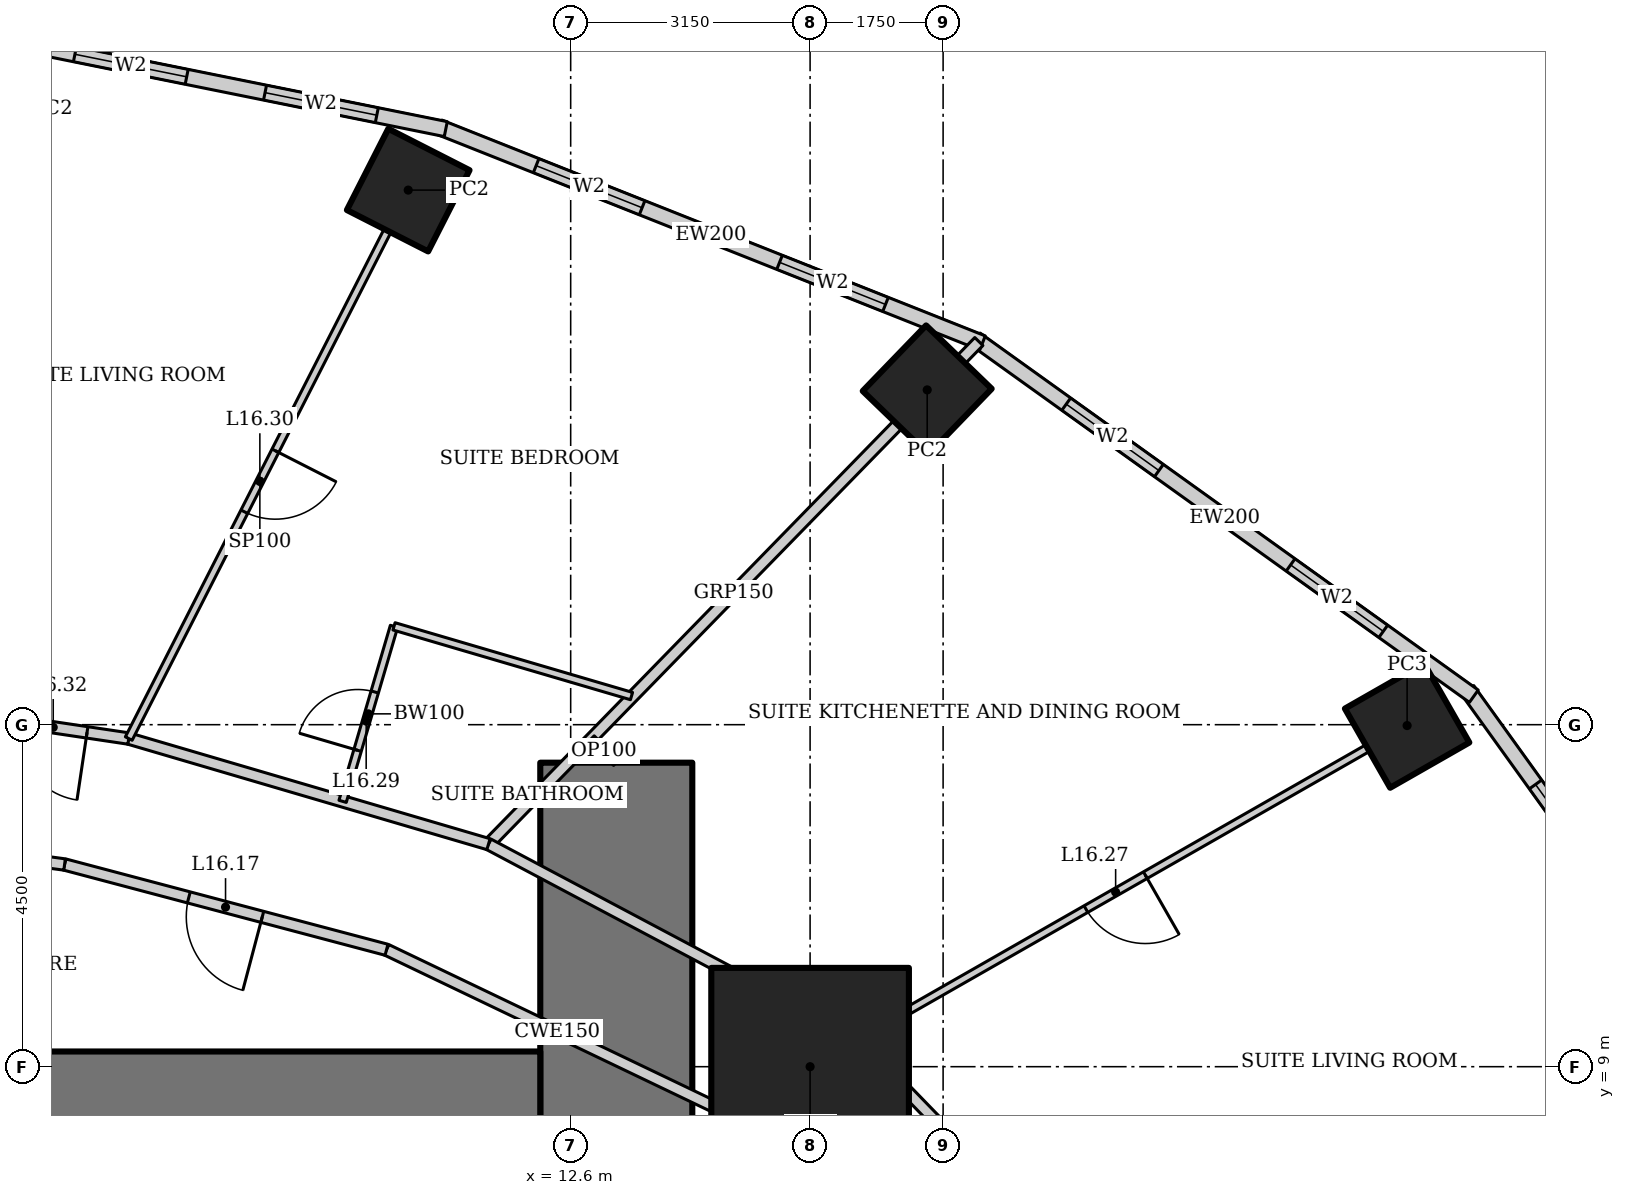
"""IFC4 building model, lengths in metres.
Left out: names, types, materials, properties, quantities, classifications, styles, units other than length and angle.
Written with IfcOpenShell. Run it as: python <this file> out.ifc"""

import sys

from ifc_helpers import new_model, si_unit, direction, frame, frame_2d, origin, origin_2d, place, context, subcontext, project, spatial, rectangle, hollow_rectangle, extrude, element, fill, save


model = new_model("IFC4")
c1 = context("Model", 3, precision=1e-05, world=origin(), true_north=direction((0.0, 1.0)))
c2 = subcontext(c1, "Body", "Model", "MODEL_VIEW")
j1 = project(units=[si_unit("LENGTHUNIT", "METRE"), si_unit("PLANEANGLEUNIT", "RADIAN")], contexts=[c1])
p1 = place(None, origin())
s1 = spatial("IfcSite", under=j1, at=p1, CompositionType="ELEMENT")
p2 = place(p1, origin())
s2 = spatial("IfcBuilding", under=s1, at=p2, CompositionType="ELEMENT")
p3 = place(p2, frame((0.0, 0.0, 73.0)))
s3 = spatial("IfcBuildingStorey", under=s2, at=p3, CompositionType="ELEMENT", Elevation=73.0)
p4 = place(p3, frame((15.75, 9.0, 0.0), z_axis=(0.0, 0.0, 1.0), x_axis=(1.0, 0.0, 0.0)))
e1 = element("IfcColumn", 1, at=p4, inside=s3, PredefinedType="COLUMN", context=c2, shape_type="SweptSolid", body=[
    extrude(hollow_rectangle(XDim=2.6, YDim=2.6, WallThickness=0.13, at=origin_2d()), origin(), (0.0, 0.0, 1.0), 3.6),
])
p5 = place(p3, frame((23.605, 13.489, 0.0), z_axis=(0.0, 0.0, 1.0), x_axis=(0.86824298017, 0.496139221777, 0.0)))
e2 = element("IfcColumn", 2, at=p5, inside=s3, PredefinedType="COLUMN", context=c2, shape_type="SweptSolid", body=[
    extrude(hollow_rectangle(XDim=1.2, YDim=1.2, WallThickness=0.12, at=origin_2d()), origin(), (0.0, 0.0, 1.0), 3.6),
])
for number, where, z_axis, x_axis in (
    (3, (17.291, 17.905, 0.0), (0.0, 0.0, 1.0), (0.695, 0.719, 0.0)),
    (4, (10.463, 20.534, 0.0), (0.0, 0.0, 1.0), (0.454, 0.891, 0.0)),
):
    element("IfcColumn", number, at=place(p3, frame(where, z_axis=z_axis, x_axis=x_axis)), inside=s3, PredefinedType="COLUMN", context=c2, shape_type="SweptSolid", body=[
        extrude(hollow_rectangle(XDim=1.2, YDim=1.2, WallThickness=0.1, at=origin_2d()), origin(), (0.0, 0.0, 1.0), 3.6),
    ])
p6 = place(p3, frame((13.2, -13.0, 0.0), z_axis=(0.0, 0.0, 1.0), x_axis=(0.0, 1.0, 0.0)))
e5 = element("IfcWall", 5, at=p6, inside=s3, PredefinedType="SHEAR", context=c2, shape_type="SweptSolid", body=[
    extrude(rectangle(XDim=26.0, YDim=2.0, at=frame_2d((13.0, 0.0))), origin(), (0.0, 0.0, 1.0), 3.6),
])
p7 = place(p6, frame((12.1, 0.0, 0.0)))
e6 = element("IfcOpeningElement", 6, at=p7, cuts=e5, PredefinedType="OPENING", context=c2, shape_type="SweptSolid", body=[
    extrude(rectangle(XDim=1.8, YDim=2.1, at=frame_2d((0.9, 1.05))), frame((0.0, 1.01, 0.0), z_axis=(0.0, -1.0, 0.0), x_axis=(1.0, 0.0, 0.0)), (0.0, 0.0, 1.0), 2.02),
])
p8 = place(p3, frame((12.2, 8.0, 0.0), z_axis=(0.0, 0.0, 1.0), x_axis=(-1.0, 0.0, 0.0)))
e7 = element("IfcWall", 7, at=p8, inside=s3, PredefinedType="SHEAR", context=c2, shape_type="SweptSolid", body=[
    extrude(rectangle(XDim=24.4, YDim=2.4, at=frame_2d((12.2, 0.0))), origin(), (0.0, 0.0, 1.0), 3.6),
])
p9 = place(p3, frame((29.26, 7.2, 0.0), z_axis=(0.0, 0.0, 1.0), x_axis=(-0.583937613703, 0.811798536155, 0.0)))
e8 = element("IfcWall", 8, at=p9, inside=s3, PredefinedType="SOLIDWALL", context=c2, shape_type="SweptSolid", body=[
    extrude(rectangle(XDim=8.323, YDim=0.2, at=frame_2d((4.162, 0.0))), origin(), (0.0, 0.0, 1.0), 3.45),
])
p10 = place(p9, frame((1.531, 0.0, 0.5)))
e9 = element("IfcOpeningElement", 9, at=p10, cuts=e8, PredefinedType="OPENING", context=c2, shape_type="SweptSolid", body=[
    extrude(rectangle(XDim=1.5, YDim=2.2, at=frame_2d((0.75, 1.1))), frame((0.0, 0.11, 0.0), z_axis=(0.0, -1.0, 0.0), x_axis=(1.0, 0.0, 0.0)), (0.0, 0.0, 1.0), 0.22),
])
p11 = place(p9, frame((5.292, 0.0, 0.5)))
e10 = element("IfcOpeningElement", 10, at=p11, cuts=e8, PredefinedType="OPENING", context=c2, shape_type="SweptSolid", body=[
    extrude(rectangle(XDim=1.5, YDim=2.2, at=frame_2d((0.75, 1.1))), frame((0.0, 0.11, 0.0), z_axis=(0.0, -1.0, 0.0), x_axis=(1.0, 0.0, 0.0)), (0.0, 0.0, 1.0), 0.22),
])
p12 = place(p3, frame((24.482, 13.875, 0.0), z_axis=(0.0, 0.0, 1.0), x_axis=(-0.812791321576, 0.582554948112, 0.0)))
e11 = element("IfcWall", 11, at=p12, inside=s3, PredefinedType="SOLIDWALL", context=c2, shape_type="SweptSolid", body=[
    extrude(rectangle(XDim=8.063, YDim=0.2, at=frame_2d((4.032, 0.0))), origin(), (0.0, 0.0, 1.0), 3.45),
])
p13 = place(p12, frame((1.466, 0.0, 0.5)))
e12 = element("IfcOpeningElement", 12, at=p13, cuts=e11, PredefinedType="OPENING", context=c2, shape_type="SweptSolid", body=[
    extrude(rectangle(XDim=1.5, YDim=2.2, at=frame_2d((0.75, 1.1))), frame((0.0, 0.11, 0.0), z_axis=(0.0, -1.0, 0.0), x_axis=(1.0, 0.0, 0.0)), (0.0, 0.0, 1.0), 0.22),
])
p14 = place(p12, frame((5.097, 0.0, 0.5)))
e13 = element("IfcOpeningElement", 13, at=p14, cuts=e11, PredefinedType="OPENING", context=c2, shape_type="SweptSolid", body=[
    extrude(rectangle(XDim=1.5, YDim=2.2, at=frame_2d((0.75, 1.1))), frame((0.0, 0.11, 0.0), z_axis=(0.0, -1.0, 0.0), x_axis=(1.0, 0.0, 0.0)), (0.0, 0.0, 1.0), 0.22),
])
p15 = place(p3, frame((18.018, 18.523, 0.0), z_axis=(0.0, 0.0, 1.0), x_axis=(-0.929358351251, 0.369178892895, 0.0)))
e14 = element("IfcWall", 14, at=p15, inside=s3, PredefinedType="SOLIDWALL", context=c2, shape_type="SweptSolid", body=[
    extrude(rectangle(XDim=7.692, YDim=0.2, at=frame_2d((3.846, 0.0))), origin(), (0.0, 0.0, 1.0), 3.45),
])
p16 = place(p15, frame((1.373, 0.0, 0.5)))
e15 = element("IfcOpeningElement", 15, at=p16, cuts=e14, PredefinedType="OPENING", context=c2, shape_type="SweptSolid", body=[
    extrude(rectangle(XDim=1.5, YDim=2.2, at=frame_2d((0.75, 1.1))), frame((0.0, 0.11, 0.0), z_axis=(0.0, -1.0, 0.0), x_axis=(1.0, 0.0, 0.0)), (0.0, 0.0, 1.0), 0.22),
])
p17 = place(p15, frame((4.819, 0.0, 0.5)))
e16 = element("IfcOpeningElement", 16, at=p17, cuts=e14, PredefinedType="OPENING", context=c2, shape_type="SweptSolid", body=[
    extrude(rectangle(XDim=1.5, YDim=2.2, at=frame_2d((0.75, 1.1))), frame((0.0, 0.11, 0.0), z_axis=(0.0, -1.0, 0.0), x_axis=(1.0, 0.0, 0.0)), (0.0, 0.0, 1.0), 0.22),
])
p18 = place(p3, frame((10.957, 21.337, 0.0), z_axis=(0.0, 0.0, 1.0), x_axis=(-0.980251657452, 0.197754110105, 0.0)))
e17 = element("IfcWall", 17, at=p18, inside=s3, PredefinedType="SOLIDWALL", context=c2, shape_type="SweptSolid", body=[
    extrude(rectangle(XDim=5.904, YDim=0.2, at=frame_2d((2.952, 0.0))), origin(), (0.0, 0.0, 1.0), 3.45),
])
p19 = place(p18, frame((0.926, 0.0, 0.5)))
e18 = element("IfcOpeningElement", 18, at=p19, cuts=e17, PredefinedType="OPENING", context=c2, shape_type="SweptSolid", body=[
    extrude(rectangle(XDim=1.5, YDim=2.2, at=frame_2d((0.75, 1.1))), frame((0.0, 0.11, 0.0), z_axis=(0.0, -1.0, 0.0), x_axis=(1.0, 0.0, 0.0)), (0.0, 0.0, 1.0), 0.22),
])
p20 = place(p18, frame((3.478, 0.0, 0.5)))
e19 = element("IfcOpeningElement", 19, at=p20, cuts=e17, PredefinedType="OPENING", context=c2, shape_type="SweptSolid", body=[
    extrude(rectangle(XDim=1.5, YDim=2.2, at=frame_2d((0.75, 1.1))), frame((0.0, 0.11, 0.0), z_axis=(0.0, -1.0, 0.0), x_axis=(1.0, 0.0, 0.0)), (0.0, 0.0, 1.0), 0.22),
])
p21 = place(p3, frame((17.97, 18.542, 0.0), z_axis=(0.0, 0.0, 1.0), x_axis=(-0.698279935955, -0.715824790743, 0.0)))
e20 = element("IfcWall", 20, at=p21, inside=s3, PredefinedType="PARTITIONING", context=c2, shape_type="SweptSolid", body=[
    extrude(rectangle(XDim=9.24, YDim=0.15, at=frame_2d((4.62, 0.0))), origin(), (0.0, 0.0, 1.0), 2.528),
])
p22 = place(p3, frame((20.484, 5.107, 0.0), z_axis=(0.0, 0.0, 1.0), x_axis=(-0.695871090686, 0.71816671125, 0.0)))
e21 = element("IfcWall", 21, at=p22, inside=s3, PredefinedType="PARTITIONING", context=c2, shape_type="SweptSolid", body=[
    extrude(rectangle(XDim=5.913, YDim=0.15, at=frame_2d((2.957, 0.0))), origin(), (0.0, 0.0, 1.0), 3.45),
])
p23 = place(p22, frame((0.15, 0.0, 0.0)))
e22 = element("IfcOpeningElement", 22, at=p23, cuts=e21, PredefinedType="OPENING", context=c2, shape_type="SweptSolid", body=[
    extrude(rectangle(XDim=0.9, YDim=2.1, at=frame_2d((0.45, 1.05))), frame((0.0, 0.085, 0.0), z_axis=(0.0, -1.0, 0.0), x_axis=(1.0, 0.0, 0.0)), (0.0, 0.0, 1.0), 0.17),
])
p24 = place(p3, frame((16.369, 9.354, 0.0), z_axis=(0.0, 0.0, 1.0), x_axis=(-0.883334368785, 0.468743419071, 0.0)))
e23 = element("IfcWall", 23, at=p24, inside=s3, PredefinedType="PARTITIONING", context=c2, shape_type="SweptSolid", body=[
    extrude(rectangle(XDim=5.491, YDim=0.15, at=frame_2d((2.746, 0.0))), origin(), (0.0, 0.0, 1.0), 3.45),
])
p25 = place(p3, frame((11.519, 11.928, 0.0), z_axis=(0.0, 0.0, 1.0), x_axis=(-0.959496227294, 0.281721475589, 0.0)))
e24 = element("IfcWall", 24, at=p25, inside=s3, PredefinedType="PARTITIONING", context=c2, shape_type="SweptSolid", body=[
    extrude(rectangle(XDim=4.933, YDim=0.15, at=frame_2d((2.466, 0.0))), origin(), (0.0, 0.0, 1.0), 3.45),
])
p26 = place(p3, frame((6.786, 13.317, 0.0), z_axis=(0.0, 0.0, 1.0), x_axis=(-0.989107488999, 0.14719502439, 0.0)))
e25 = element("IfcWall", 25, at=p26, inside=s3, PredefinedType="PARTITIONING", context=c2, shape_type="SweptSolid", body=[
    extrude(rectangle(XDim=3.627, YDim=0.15, at=frame_2d((1.814, 0.0))), origin(), (0.0, 0.0, 1.0), 3.45),
])
p27 = place(p26, frame((0.554, 0.0, 0.0)))
e26 = element("IfcOpeningElement", 26, at=p27, cuts=e25, PredefinedType="OPENING", context=c2, shape_type="SweptSolid", body=[
    extrude(rectangle(XDim=0.9, YDim=2.1, at=frame_2d((0.45, 1.05))), frame((0.0, 0.085, 0.0), z_axis=(0.0, -1.0, 0.0), x_axis=(1.0, 0.0, 0.0)), (0.0, 0.0, 1.0), 0.17),
])
p28 = place(p3, frame((18.672, 4.655, 0.0), z_axis=(0.0, 0.0, 1.0), x_axis=(-0.731260145007, 0.682098673452, 0.0)))
e27 = element("IfcWall", 27, at=p28, inside=s3, PredefinedType="PARTITIONING", context=c2, shape_type="SweptSolid", body=[
    extrude(rectangle(XDim=5.468, YDim=0.15, at=frame_2d((2.734, 0.0))), origin(), (0.0, 0.0, 1.0), 3.45),
])
p29 = place(p28, frame((2.234, 0.0, 0.0)))
e28 = element("IfcOpeningElement", 28, at=p29, cuts=e27, PredefinedType="OPENING", context=c2, shape_type="SweptSolid", body=[
    extrude(rectangle(XDim=1.0, YDim=2.1, at=frame_2d((0.5, 1.05))), frame((0.0, 0.085, 0.0), z_axis=(0.0, -1.0, 0.0), x_axis=(1.0, 0.0, 0.0)), (0.0, 0.0, 1.0), 0.17),
])
p30 = place(p3, frame((14.673, 8.385, 0.0), z_axis=(0.0, 0.0, 1.0), x_axis=(-0.901869692799, 0.43200816799, 0.0)))
e29 = element("IfcWall", 29, at=p30, inside=s3, PredefinedType="PARTITIONING", context=c2, shape_type="SweptSolid", body=[
    extrude(rectangle(XDim=4.986, YDim=0.15, at=frame_2d((2.493, 0.0))), origin(), (0.0, 0.0, 1.0), 3.45),
])
p31 = place(p3, frame((10.177, 10.539, 0.0), z_axis=(0.0, 0.0, 1.0), x_axis=(-0.966672790407, 0.256015070428, 0.0)))
e30 = element("IfcWall", 30, at=p31, inside=s3, PredefinedType="PARTITIONING", context=c2, shape_type="SweptSolid", body=[
    extrude(rectangle(XDim=4.382, YDim=0.15, at=frame_2d((2.191, 0.0))), origin(), (0.0, 0.0, 1.0), 3.45),
])
p32 = place(p31, frame((1.691, 0.0, 0.0)))
e31 = element("IfcOpeningElement", 31, at=p32, cuts=e30, PredefinedType="OPENING", context=c2, shape_type="SweptSolid", body=[
    extrude(rectangle(XDim=1.0, YDim=2.1, at=frame_2d((0.5, 1.05))), frame((0.0, 0.085, 0.0), z_axis=(0.0, -1.0, 0.0), x_axis=(1.0, 0.0, 0.0)), (0.0, 0.0, 1.0), 0.17),
])
p33 = place(p3, frame((5.941, 11.66, 0.0), z_axis=(0.0, 0.0, 1.0), x_axis=(-0.991129053928, 0.13290296633, 0.0)))
e32 = element("IfcWall", 32, at=p33, inside=s3, PredefinedType="PARTITIONING", context=c2, shape_type="SweptSolid", body=[
    extrude(rectangle(XDim=3.18, YDim=0.15, at=frame_2d((1.59, 0.0))), origin(), (0.0, 0.0, 1.0), 3.45),
])
p34 = place(p3, frame((23.171, 13.24, 0.0), z_axis=(0.0, 0.0, 1.0), x_axis=(-0.868243142124, -0.496138938357, 0.0)))
e33 = element("IfcWall", 33, at=p34, inside=s3, PredefinedType="PARTITIONING", context=c2, shape_type="SweptSolid", body=[
    extrude(rectangle(XDim=7.834, YDim=0.1, at=frame_2d((3.917, 0.0))), origin(), (0.0, 0.0, 1.0), 2.693),
])
p35 = place(p34, frame((3.467, 0.0, 0.0)))
e34 = element("IfcOpeningElement", 34, at=p35, cuts=e33, PredefinedType="OPENING", context=c2, shape_type="SweptSolid", body=[
    extrude(rectangle(XDim=0.9, YDim=2.1, at=frame_2d((0.45, 1.05))), frame((0.0, 0.06, 0.0), z_axis=(0.0, -1.0, 0.0), x_axis=(1.0, 0.0, 0.0)), (0.0, 0.0, 1.0), 0.12),
])
p36 = place(p3, frame((9.6, 12.491, 0.0), z_axis=(0.0, 0.0, 1.0), x_axis=(0.281687126576, 0.959506311976, 0.0)))
e35 = element("IfcWall", 35, at=p36, inside=s3, PredefinedType="PARTITIONING", context=c2, shape_type="SweptSolid", body=[
    extrude(rectangle(XDim=2.4, YDim=0.1, at=frame_2d((1.2, 0.0))), origin(), (0.0, 0.0, 1.0), 3.45),
])
p37 = place(p36, frame((0.7, 0.0, 0.0)))
e36 = element("IfcOpeningElement", 36, at=p37, cuts=e35, PredefinedType="OPENING", context=c2, shape_type="SweptSolid", body=[
    extrude(rectangle(XDim=0.8, YDim=2.1, at=frame_2d((0.4, 1.05))), frame((0.0, 0.06, 0.0), z_axis=(0.0, -1.0, 0.0), x_axis=(1.0, 0.0, 0.0)), (0.0, 0.0, 1.0), 0.12),
])
p38 = place(p3, frame((10.276, 14.794, 0.0), z_axis=(0.0, 0.0, 1.0), x_axis=(0.959495516486, -0.281723896473, 0.0)))
e37 = element("IfcWall", 37, at=p38, inside=s3, PredefinedType="PARTITIONING", context=c2, shape_type="SweptSolid", body=[
    extrude(rectangle(XDim=3.257, YDim=0.1, at=frame_2d((1.628, 0.0))), origin(), (0.0, 0.0, 1.0), 3.45),
])
p39 = place(p3, frame((10.236, 20.088, 0.0), z_axis=(0.0, 0.0, 1.0), x_axis=(-0.453985938962, -0.891008848006, 0.0)))
e38 = element("IfcWall", 38, at=p39, inside=s3, PredefinedType="PARTITIONING", context=c2, shape_type="SweptSolid", body=[
    extrude(rectangle(XDim=7.599, YDim=0.1, at=frame_2d((3.8, 0.0))), origin(), (0.0, 0.0, 1.0), 2.528),
])
p40 = place(p39, frame((3.35, 0.0, 0.0)))
e39 = element("IfcOpeningElement", 39, at=p40, cuts=e38, PredefinedType="OPENING", context=c2, shape_type="SweptSolid", body=[
    extrude(rectangle(XDim=0.9, YDim=2.1, at=frame_2d((0.45, 1.05))), frame((0.0, 0.06, 0.0), z_axis=(0.0, -1.0, 0.0), x_axis=(1.0, 0.0, 0.0)), (0.0, 0.0, 1.0), 0.12),
])
p41 = place(p3, frame((13.2, 13.0, 0.0), z_axis=(0.0, 0.0, 1.0), x_axis=(-0.715906247499, 0.698196422786, 0.0)))
e40 = element("IfcWall", 40, at=p41, inside=s3, PredefinedType="PARTITIONING", context=c2, shape_type="SweptSolid", body=[
    extrude(rectangle(XDim=0.455, YDim=0.1, at=frame_2d((0.228, 0.0))), origin(), (0.0, 0.0, 1.0), 3.45),
])
p42 = place(p11, origin())
e41 = element("IfcWindow", 41, at=p42, inside=s3, PartitioningType="SINGLE_PANEL", PredefinedType="WINDOW", context=c2, shape_type="SweptSolid", body=[
    extrude(rectangle(XDim=1.5, YDim=2.2, at=frame_2d((0.75, 1.1))), frame((0.0, 0.03, 0.0), z_axis=(0.0, -1.0, 0.0), x_axis=(1.0, 0.0, 0.0)), (0.0, 0.0, 1.0), 0.06),
])
fill(e10, e41)
p43 = place(p13, origin())
e42 = element("IfcWindow", 42, at=p43, inside=s3, PartitioningType="SINGLE_PANEL", PredefinedType="WINDOW", context=c2, shape_type="SweptSolid", body=[
    extrude(rectangle(XDim=1.5, YDim=2.2, at=frame_2d((0.75, 1.1))), frame((0.0, 0.03, 0.0), z_axis=(0.0, -1.0, 0.0), x_axis=(1.0, 0.0, 0.0)), (0.0, 0.0, 1.0), 0.06),
])
fill(e12, e42)
p44 = place(p14, origin())
e43 = element("IfcWindow", 43, at=p44, inside=s3, PartitioningType="SINGLE_PANEL", PredefinedType="WINDOW", context=c2, shape_type="SweptSolid", body=[
    extrude(rectangle(XDim=1.5, YDim=2.2, at=frame_2d((0.75, 1.1))), frame((0.0, 0.03, 0.0), z_axis=(0.0, -1.0, 0.0), x_axis=(1.0, 0.0, 0.0)), (0.0, 0.0, 1.0), 0.06),
])
fill(e13, e43)
p45 = place(p16, origin())
e44 = element("IfcWindow", 44, at=p45, inside=s3, PartitioningType="SINGLE_PANEL", PredefinedType="WINDOW", context=c2, shape_type="SweptSolid", body=[
    extrude(rectangle(XDim=1.5, YDim=2.2, at=frame_2d((0.75, 1.1))), frame((0.0, 0.03, 0.0), z_axis=(0.0, -1.0, 0.0), x_axis=(1.0, 0.0, 0.0)), (0.0, 0.0, 1.0), 0.06),
])
fill(e15, e44)
p46 = place(p17, origin())
e45 = element("IfcWindow", 45, at=p46, inside=s3, PartitioningType="SINGLE_PANEL", PredefinedType="WINDOW", context=c2, shape_type="SweptSolid", body=[
    extrude(rectangle(XDim=1.5, YDim=2.2, at=frame_2d((0.75, 1.1))), frame((0.0, 0.03, 0.0), z_axis=(0.0, -1.0, 0.0), x_axis=(1.0, 0.0, 0.0)), (0.0, 0.0, 1.0), 0.06),
])
fill(e16, e45)
p47 = place(p19, origin())
e46 = element("IfcWindow", 46, at=p47, inside=s3, PartitioningType="SINGLE_PANEL", PredefinedType="WINDOW", context=c2, shape_type="SweptSolid", body=[
    extrude(rectangle(XDim=1.5, YDim=2.2, at=frame_2d((0.75, 1.1))), frame((0.0, 0.03, 0.0), z_axis=(0.0, -1.0, 0.0), x_axis=(1.0, 0.0, 0.0)), (0.0, 0.0, 1.0), 0.06),
])
fill(e18, e46)
p48 = place(p20, origin())
e47 = element("IfcWindow", 47, at=p48, inside=s3, PartitioningType="SINGLE_PANEL", PredefinedType="WINDOW", context=c2, shape_type="SweptSolid", body=[
    extrude(rectangle(XDim=1.5, YDim=2.2, at=frame_2d((0.75, 1.1))), frame((0.0, 0.03, 0.0), z_axis=(0.0, -1.0, 0.0), x_axis=(1.0, 0.0, 0.0)), (0.0, 0.0, 1.0), 0.06),
])
fill(e19, e47)
p49 = place(p32, origin())
e48 = element("IfcDoor", 48, at=p49, inside=s3, OperationType="SINGLE_SWING_LEFT", PredefinedType="DOOR", context=c2, shape_type="SweptSolid", body=[
    extrude(rectangle(XDim=1.0, YDim=2.1, at=frame_2d((0.5, 1.05))), frame((0.0, 0.025, 0.0), z_axis=(0.0, -1.0, 0.0), x_axis=(1.0, 0.0, 0.0)), (0.0, 0.0, 1.0), 0.05),
])
fill(e31, e48)
p50 = place(p35, origin())
e49 = element("IfcDoor", 49, at=p50, inside=s3, OperationType="SINGLE_SWING_LEFT", PredefinedType="DOOR", context=c2, shape_type="SweptSolid", body=[
    extrude(rectangle(XDim=0.9, YDim=2.1, at=frame_2d((0.45, 1.05))), frame((0.0, 0.025, 0.0), z_axis=(0.0, -1.0, 0.0), x_axis=(1.0, 0.0, 0.0)), (0.0, 0.0, 1.0), 0.05),
])
fill(e34, e49)
p51 = place(p37, origin())
e50 = element("IfcDoor", 50, at=p51, inside=s3, OperationType="SINGLE_SWING_LEFT", PredefinedType="DOOR", context=c2, shape_type="SweptSolid", body=[
    extrude(rectangle(XDim=0.8, YDim=2.1, at=frame_2d((0.4, 1.05))), frame((0.0, 0.025, 0.0), z_axis=(0.0, -1.0, 0.0), x_axis=(1.0, 0.0, 0.0)), (0.0, 0.0, 1.0), 0.05),
])
fill(e36, e50)
p52 = place(p40, origin())
e51 = element("IfcDoor", 51, at=p52, inside=s3, OperationType="SINGLE_SWING_LEFT", PredefinedType="DOOR", context=c2, shape_type="SweptSolid", body=[
    extrude(rectangle(XDim=0.9, YDim=2.1, at=frame_2d((0.45, 1.05))), frame((0.0, 0.025, 0.0), z_axis=(0.0, -1.0, 0.0), x_axis=(1.0, 0.0, 0.0)), (0.0, 0.0, 1.0), 0.05),
])
fill(e39, e51)
p53 = place(p27, origin())
e52 = element("IfcDoor", 52, at=p53, inside=s3, OperationType="SINGLE_SWING_LEFT", PredefinedType="DOOR", context=c2, shape_type="SweptSolid", body=[
    extrude(rectangle(XDim=0.9, YDim=2.1, at=frame_2d((0.45, 1.05))), frame((0.0, 0.025, 0.0), z_axis=(0.0, -1.0, 0.0), x_axis=(1.0, 0.0, 0.0)), (0.0, 0.0, 1.0), 0.05),
])
fill(e26, e52)
save(model, sys.argv[1])
